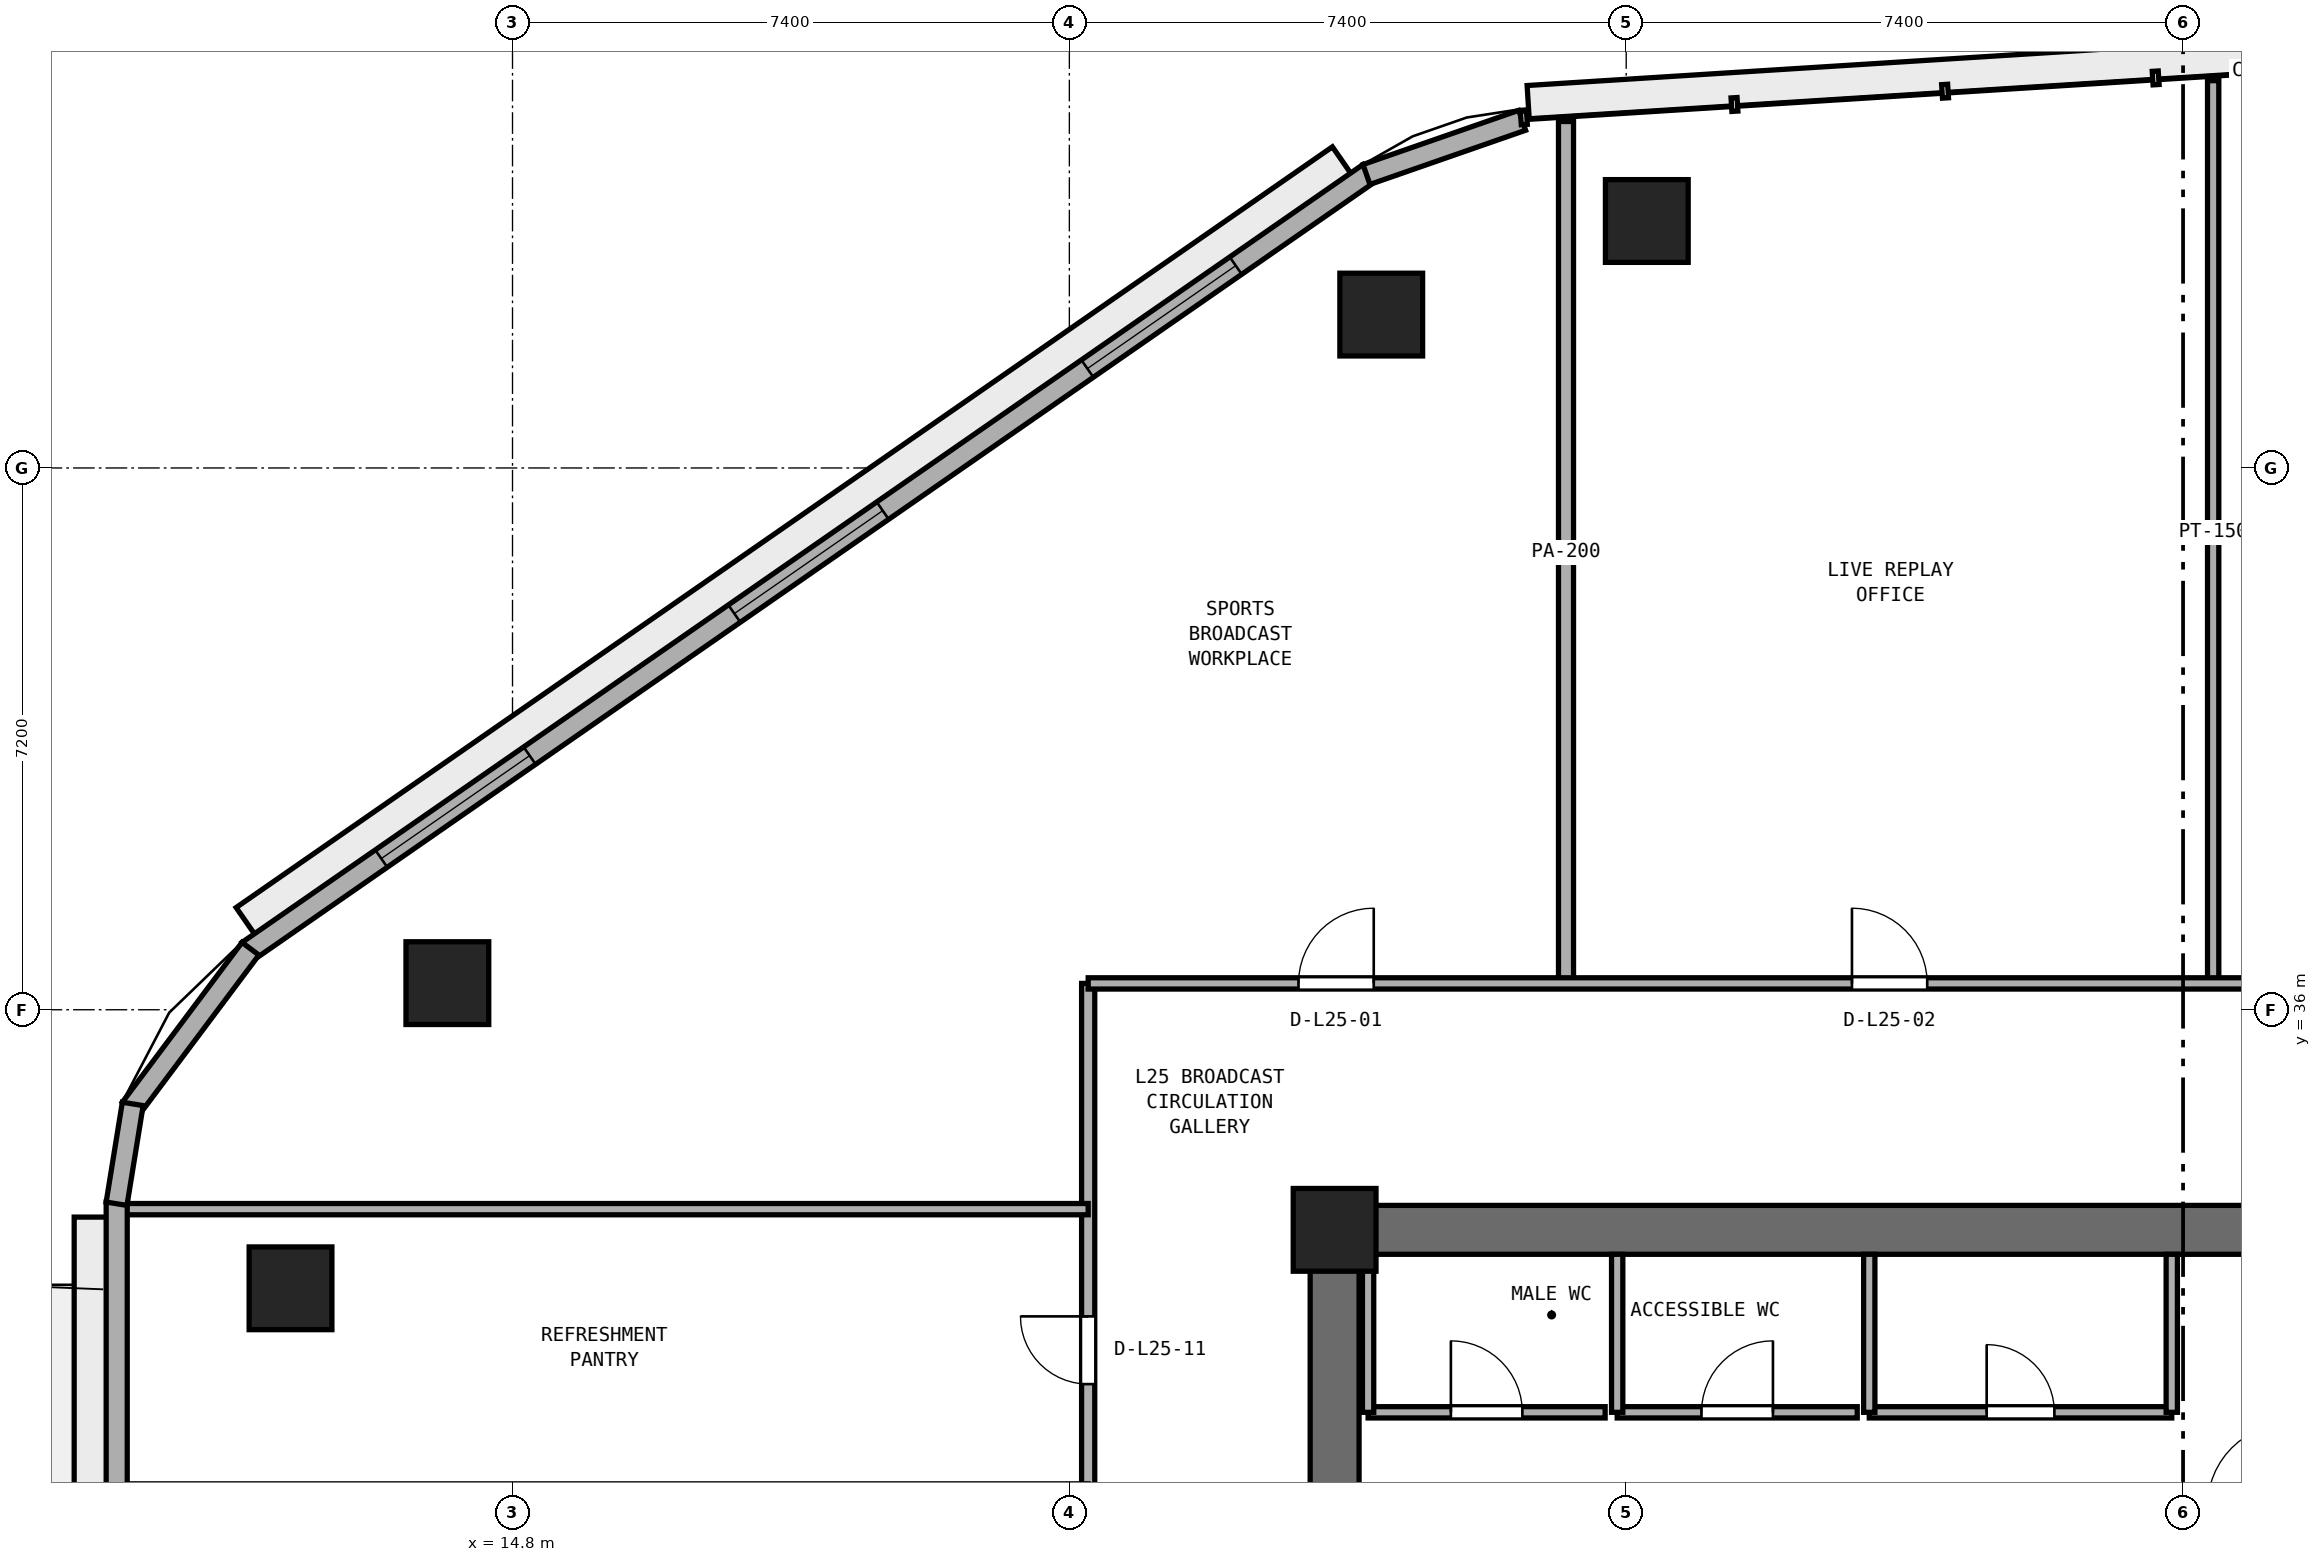
"""IFC4 building model, lengths in metres.
Left out: names, types, materials, properties, quantities, classifications, styles, units other than length and angle.
Written with IfcOpenShell. Run it as: python <this file> out.ifc"""

import sys

from ifc_helpers import new_model, si_unit, direction, frame, frame_2d, origin, origin_2d, place, context, subcontext, project, spatial, rectangle, extrude, element, fill, save


model = new_model("IFC4")
c1 = context("Model", 3, precision=1e-05, world=origin(), true_north=direction((0.0, 1.0)))
c2 = subcontext(c1, "Body", "Model", "MODEL_VIEW")
j1 = project(units=[si_unit("LENGTHUNIT", "METRE"), si_unit("PLANEANGLEUNIT", "RADIAN")], contexts=[c1])
p1 = place(None, origin())
s1 = spatial("IfcSite", under=j1, at=p1, CompositionType="ELEMENT")
p2 = place(p1, origin())
s2 = spatial("IfcBuilding", under=s1, at=p2, CompositionType="ELEMENT")
p3 = place(p2, frame((0.0, 0.0, 101.0)))
s3 = spatial("IfcBuildingStorey", under=s2, at=p3, CompositionType="ELEMENT", Elevation=101.0)
p4 = place(p3, frame((25.4, 33.075, 0.0), z_axis=(0.0, 0.0, 1.0), x_axis=(1.0, 0.0, 0.0)))
e1 = element("IfcWall", 1, at=p4, inside=s3, PredefinedType="SHEAR", context=c2, shape_type="SweptSolid", body=[
    extrude(rectangle(XDim=23.2, YDim=0.65, at=frame_2d((11.6, 0.0))), origin(), (0.0, 0.0, 1.0), 3.525),
])
p5 = place(p3, frame((25.725, 17.65, 0.0), z_axis=(0.0, 0.0, 1.0), x_axis=(0.0, 1.0, 0.0)))
e2 = element("IfcWall", 2, at=p5, inside=s3, PredefinedType="SHEAR", context=c2, shape_type="SweptSolid", body=[
    extrude(rectangle(XDim=15.1, YDim=0.65, at=frame_2d((7.55, 0.0))), origin(), (0.0, 0.0, 1.0), 3.525),
])
p6 = place(p5, frame((6.8, 0.0, 0.0)))
e3 = element("IfcOpeningElement", 3, at=p6, cuts=e2, PredefinedType="OPENING", context=c2, shape_type="SweptSolid", body=[
    extrude(rectangle(XDim=1.5, YDim=2.15, at=frame_2d((0.75, 1.075))), frame((0.0, 0.335, 0.0), z_axis=(0.0, -1.0, 0.0), x_axis=(1.0, 0.0, 0.0)), (0.0, 0.0, 1.0), 0.67),
])
p7 = place(p3, frame((25.725, 33.075, 0.0), z_axis=(0.0, 0.0, 1.0), x_axis=(1.0, 0.0, 0.0)))
e4 = element("IfcColumn", 4, at=p7, inside=s3, PredefinedType="PILASTER", context=c2, shape_type="SweptSolid", body=[
    extrude(rectangle(XDim=1.1, YDim=1.1, at=origin_2d()), origin(), (0.0, 0.0, 1.0), 3.8),
])
for number, where, z_axis, x_axis in (
    (5, (29.874, 46.482, 0.0), (0.0, 0.0, 1.0), (1.0, 0.0, 0.0)),
    (6, (26.344, 45.238, 0.0), (0.0, 0.0, 1.0), (1.0, 0.0, 0.0)),
    (7, (13.934, 36.354, 0.0), (0.0, 0.0, 1.0), (1.0, 0.0, 0.0)),
    (8, (11.85, 32.298, 0.0), (0.0, 0.0, 1.0), (1.0, 0.0, 0.0)),
):
    element("IfcColumn", number, at=place(p3, frame(where, z_axis=z_axis, x_axis=x_axis)), inside=s3, PredefinedType="COLUMN", context=c2, shape_type="SweptSolid", body=[
        extrude(rectangle(XDim=1.1, YDim=1.1, at=origin_2d()), origin(), (0.0, 0.0, 1.0), 3.8),
    ])
p8 = place(p3, frame((26.17, 30.65, 0.0), z_axis=(0.0, 0.0, 1.0), x_axis=(1.0, 0.0, 0.0)))
e9 = element("IfcWall", 9, at=p8, inside=s3, PredefinedType="PARTITIONING", context=c2, shape_type="SweptSolid", body=[
    extrude(rectangle(XDim=3.15, YDim=0.15, at=frame_2d((1.575, 0.0))), origin(), (0.0, 0.0, 1.0), 3.525),
])
p9 = place(p8, frame((1.1, 0.0, 0.0)))
e10 = element("IfcOpeningElement", 10, at=p9, cuts=e9, PredefinedType="OPENING", context=c2, shape_type="SweptSolid", body=[
    extrude(rectangle(XDim=0.95, YDim=2.1, at=frame_2d((0.475, 1.05))), frame((0.0, 0.085, 0.0), z_axis=(0.0, -1.0, 0.0), x_axis=(1.0, 0.0, 0.0)), (0.0, 0.0, 1.0), 0.17),
])
p10 = place(p3, frame((26.17, 30.65, 0.0), z_axis=(0.0, 0.0, 1.0), x_axis=(0.0, 1.0, 0.0)))
e11 = element("IfcWall", 11, at=p10, inside=s3, PredefinedType="PARTITIONING", context=c2, shape_type="SweptSolid", body=[
    extrude(rectangle(XDim=2.1, YDim=0.15, at=frame_2d((1.05, 0.0))), origin(), (0.0, 0.0, 1.0), 3.525),
])
p11 = place(p3, frame((29.48, 30.65, 0.0), z_axis=(0.0, 0.0, 1.0), x_axis=(1.0, 0.0, 0.0)))
e12 = element("IfcWall", 12, at=p11, inside=s3, PredefinedType="PARTITIONING", context=c2, shape_type="SweptSolid", body=[
    extrude(rectangle(XDim=3.19, YDim=0.15, at=frame_2d((1.595, 0.0))), origin(), (0.0, 0.0, 1.0), 3.525),
])
p12 = place(p11, frame((1.12, 0.0, 0.0)))
e13 = element("IfcOpeningElement", 13, at=p12, cuts=e12, PredefinedType="OPENING", context=c2, shape_type="SweptSolid", body=[
    extrude(rectangle(XDim=0.95, YDim=2.1, at=frame_2d((0.475, 1.05))), frame((0.0, 0.085, 0.0), z_axis=(0.0, -1.0, 0.0), x_axis=(1.0, 0.0, 0.0)), (0.0, 0.0, 1.0), 0.17),
])
p13 = place(p3, frame((29.48, 30.65, 0.0), z_axis=(0.0, 0.0, 1.0), x_axis=(0.0, 1.0, 0.0)))
e14 = element("IfcWall", 14, at=p13, inside=s3, PredefinedType="PARTITIONING", context=c2, shape_type="SweptSolid", body=[
    extrude(rectangle(XDim=2.1, YDim=0.15, at=frame_2d((1.05, 0.0))), origin(), (0.0, 0.0, 1.0), 3.525),
])
p14 = place(p3, frame((32.83, 30.65, 0.0), z_axis=(0.0, 0.0, 1.0), x_axis=(1.0, 0.0, 0.0)))
e15 = element("IfcWall", 15, at=p14, inside=s3, PredefinedType="PARTITIONING", context=c2, shape_type="SweptSolid", body=[
    extrude(rectangle(XDim=4.02, YDim=0.15, at=frame_2d((2.01, 0.0))), origin(), (0.0, 0.0, 1.0), 3.525),
])
p15 = place(p14, frame((1.56, 0.0, 0.0)))
e16 = element("IfcOpeningElement", 16, at=p15, cuts=e15, PredefinedType="OPENING", context=c2, shape_type="SweptSolid", body=[
    extrude(rectangle(XDim=0.9, YDim=2.1, at=frame_2d((0.45, 1.05))), frame((0.0, 0.085, 0.0), z_axis=(0.0, -1.0, 0.0), x_axis=(1.0, 0.0, 0.0)), (0.0, 0.0, 1.0), 0.17),
])
for number, where, z_axis, x_axis in (
    (17, (32.83, 30.65, 0.0), (0.0, 0.0, 1.0), (0.0, 1.0, 0.0)),
    (18, (36.85, 30.65, 0.0), (0.0, 0.0, 1.0), (0.0, 1.0, 0.0)),
):
    element("IfcWall", number, at=place(p3, frame(where, z_axis=z_axis, x_axis=x_axis)), inside=s3, PredefinedType="PARTITIONING", context=c2, shape_type="SweptSolid", body=[
        extrude(rectangle(XDim=2.1, YDim=0.15, at=frame_2d((1.05, 0.0))), origin(), (0.0, 0.0, 1.0), 3.525),
    ])
p16 = place(p3, frame((37.4, 36.35, 0.0), z_axis=(0.0, 0.0, 1.0), x_axis=(0.0, 1.0, 0.0)))
e19 = element("IfcWall", 19, at=p16, inside=s3, PredefinedType="PARTITIONING", context=c2, shape_type="SweptSolid", body=[
    extrude(rectangle(XDim=11.997, YDim=0.15, at=frame_2d((5.998, 0.0))), origin(), (0.0, 0.0, 1.0), 3.525),
])
p17 = place(p3, frame((28.8, 36.35, 0.0), z_axis=(0.0, 0.0, 1.0), x_axis=(0.0, 1.0, 0.0)))
e20 = element("IfcWall", 20, at=p17, inside=s3, PredefinedType="PARTITIONING", context=c2, shape_type="SweptSolid", body=[
    extrude(rectangle(XDim=11.454, YDim=0.2, at=frame_2d((5.727, 0.0))), origin(), (0.0, 0.0, 1.0), 3.525),
])
p18 = place(p3, frame((22.45, 14.05, 0.0), z_axis=(0.0, 0.0, 1.0), x_axis=(0.0, 1.0, 0.0)))
e21 = element("IfcWall", 21, at=p18, inside=s3, PredefinedType="PARTITIONING", context=c2, shape_type="SweptSolid", body=[
    extrude(rectangle(XDim=22.3, YDim=0.175, at=frame_2d((11.15, 0.0))), origin(), (0.0, 0.0, 1.0), 3.525),
])
p19 = place(p18, frame((5.075, 0.0, 0.0)))
e22 = element("IfcOpeningElement", 22, at=p19, cuts=e21, PredefinedType="OPENING", context=c2, shape_type="SweptSolid", body=[
    extrude(rectangle(XDim=0.9, YDim=2.1, at=frame_2d((0.45, 1.05))), frame((0.0, 0.097, 0.0), z_axis=(0.0, -1.0, 0.0), x_axis=(1.0, 0.0, 0.0)), (0.0, 0.0, 1.0), 0.195),
])
p20 = place(p18, frame((11.35, 0.0, 0.0)))
e23 = element("IfcOpeningElement", 23, at=p20, cuts=e21, PredefinedType="OPENING", context=c2, shape_type="SweptSolid", body=[
    extrude(rectangle(XDim=0.9, YDim=2.1, at=frame_2d((0.45, 1.05))), frame((0.0, 0.097, 0.0), z_axis=(0.0, -1.0, 0.0), x_axis=(1.0, 0.0, 0.0)), (0.0, 0.0, 1.0), 0.195),
])
p21 = place(p18, frame((16.975, 0.0, 0.0)))
e24 = element("IfcOpeningElement", 24, at=p21, cuts=e21, PredefinedType="OPENING", context=c2, shape_type="SweptSolid", body=[
    extrude(rectangle(XDim=0.9, YDim=2.1, at=frame_2d((0.45, 1.05))), frame((0.0, 0.097, 0.0), z_axis=(0.0, -1.0, 0.0), x_axis=(1.0, 0.0, 0.0)), (0.0, 0.0, 1.0), 0.195),
])
p22 = place(p3, frame((9.605, 33.35, 0.0), z_axis=(0.0, 0.0, 1.0), x_axis=(1.0, 0.0, 0.0)))
e25 = element("IfcWall", 25, at=p22, inside=s3, PredefinedType="PARTITIONING", context=c2, shape_type="SweptSolid", body=[
    extrude(rectangle(XDim=12.845, YDim=0.15, at=frame_2d((6.422, 0.0))), origin(), (0.0, 0.0, 1.0), 3.525),
])
p23 = place(p3, frame((22.45, 36.35, 0.0), z_axis=(0.0, 0.0, 1.0), x_axis=(1.0, 0.0, 0.0)))
e26 = element("IfcWall", 26, at=p23, inside=s3, PredefinedType="PARTITIONING", context=c2, shape_type="SweptSolid", body=[
    extrude(rectangle(XDim=29.1, YDim=0.15, at=frame_2d((14.55, 0.0))), origin(), (0.0, 0.0, 1.0), 3.525),
])
p24 = place(p23, frame((2.795, 0.0, 0.0)))
e27 = element("IfcOpeningElement", 27, at=p24, cuts=e26, PredefinedType="OPENING", context=c2, shape_type="SweptSolid", body=[
    extrude(rectangle(XDim=1.0, YDim=2.12, at=frame_2d((0.5, 1.06))), frame((0.0, 0.085, 0.0), z_axis=(0.0, -1.0, 0.0), x_axis=(1.0, 0.0, 0.0)), (0.0, 0.0, 1.0), 0.17),
])
p25 = place(p23, frame((10.15, 0.0, 0.0)))
e28 = element("IfcOpeningElement", 28, at=p25, cuts=e26, PredefinedType="OPENING", context=c2, shape_type="SweptSolid", body=[
    extrude(rectangle(XDim=1.0, YDim=2.12, at=frame_2d((0.5, 1.06))), frame((0.0, 0.085, 0.0), z_axis=(0.0, -1.0, 0.0), x_axis=(1.0, 0.0, 0.0)), (0.0, 0.0, 1.0), 0.17),
])
p26 = place(p23, frame((18.65, 0.0, 0.0)))
e29 = element("IfcOpeningElement", 29, at=p26, cuts=e26, PredefinedType="OPENING", context=c2, shape_type="SweptSolid", body=[
    extrude(rectangle(XDim=1.0, YDim=2.12, at=frame_2d((0.5, 1.06))), frame((0.0, 0.085, 0.0), z_axis=(0.0, -1.0, 0.0), x_axis=(1.0, 0.0, 0.0)), (0.0, 0.0, 1.0), 0.17),
])
p27 = place(p23, frame((25.605, 0.0, 0.0)))
e30 = element("IfcOpeningElement", 30, at=p27, cuts=e26, PredefinedType="OPENING", context=c2, shape_type="SweptSolid", body=[
    extrude(rectangle(XDim=1.0, YDim=2.12, at=frame_2d((0.5, 1.06))), frame((0.0, 0.085, 0.0), z_axis=(0.0, -1.0, 0.0), x_axis=(1.0, 0.0, 0.0)), (0.0, 0.0, 1.0), 0.17),
])
p28 = place(p3, frame((26.182, 47.118, 0.0), z_axis=(0.0, 0.0, 1.0), x_axis=(-0.821547956627, -0.570139417127, 0.0)))
e31 = element("IfcWall", 31, at=p28, inside=s3, PredefinedType="STANDARD", context=c2, shape_type="SweptSolid", body=[
    extrude(rectangle(XDim=18.132, YDim=0.28, at=frame_2d((9.066, 0.0))), origin(), (0.0, 0.0, 1.0), 3.525),
])
p29 = place(p28, frame((2.156, 0.0, 0.9)))
e32 = element("IfcOpeningElement", 32, at=p29, cuts=e31, PredefinedType="OPENING", context=c2, shape_type="SweptSolid", body=[
    extrude(rectangle(XDim=2.4, YDim=1.75, at=frame_2d((1.2, 0.875))), frame((0.0, 0.15, 0.0), z_axis=(0.0, -1.0, 0.0), x_axis=(1.0, 0.0, 0.0)), (0.0, 0.0, 1.0), 0.3),
])
p30 = place(p28, frame((7.866, 0.0, 0.9)))
e33 = element("IfcOpeningElement", 33, at=p30, cuts=e31, PredefinedType="OPENING", context=c2, shape_type="SweptSolid", body=[
    extrude(rectangle(XDim=2.4, YDim=1.75, at=frame_2d((1.2, 0.875))), frame((0.0, 0.15, 0.0), z_axis=(0.0, -1.0, 0.0), x_axis=(1.0, 0.0, 0.0)), (0.0, 0.0, 1.0), 0.3),
])
p31 = place(p28, frame((13.577, 0.0, 0.9)))
e34 = element("IfcOpeningElement", 34, at=p31, cuts=e31, PredefinedType="OPENING", context=c2, shape_type="SweptSolid", body=[
    extrude(rectangle(XDim=2.4, YDim=1.75, at=frame_2d((1.2, 0.875))), frame((0.0, 0.15, 0.0), z_axis=(0.0, -1.0, 0.0), x_axis=(1.0, 0.0, 0.0)), (0.0, 0.0, 1.0), 0.3),
])
p32 = place(p3, frame((9.54, 33.444, 0.0), z_axis=(0.0, 0.0, 1.0), x_axis=(0.0, -1.0, 0.0)))
e35 = element("IfcWall", 35, at=p32, inside=s3, PredefinedType="STANDARD", context=c2, shape_type="SweptSolid", body=[
    extrude(rectangle(XDim=17.301, YDim=0.28, at=frame_2d((8.65, 0.0))), origin(), (0.0, 0.0, 1.0), 3.525),
])
p33 = place(p32, frame((8.1, 0.0, 0.0)))
e36 = element("IfcOpeningElement", 36, at=p33, cuts=e35, PredefinedType="OPENING", context=c2, shape_type="SweptSolid", body=[
    extrude(rectangle(XDim=1.1, YDim=2.2, at=frame_2d((0.55, 1.1))), frame((0.0, 0.15, 0.0), z_axis=(0.0, -1.0, 0.0), x_axis=(1.0, 0.0, 0.0)), (0.0, 0.0, 1.0), 0.3),
])
p34 = place(p32, frame((12.884, 0.0, 0.9)))
e37 = element("IfcOpeningElement", 37, at=p34, cuts=e35, PredefinedType="OPENING", context=c2, shape_type="SweptSolid", body=[
    extrude(rectangle(XDim=2.4, YDim=1.75, at=frame_2d((1.2, 0.875))), frame((0.0, 0.15, 0.0), z_axis=(0.0, -1.0, 0.0), x_axis=(1.0, 0.0, 0.0)), (0.0, 0.0, 1.0), 0.3),
])
p35 = place(p3, frame((28.217, 47.82, 0.0), z_axis=(0.0, 0.0, 1.0), x_axis=(-0.944478751803, -0.328572499447, 0.0)))
e38 = element("IfcWall", 38, at=p35, inside=s3, PredefinedType="STANDARD", context=c2, shape_type="SweptSolid", body=[
    extrude(rectangle(XDim=2.19, YDim=0.28, at=frame_2d((1.095, 0.0))), origin(), (0.0, 0.0, 1.0), 3.525),
])
p36 = place(p3, frame((11.318, 36.811, 0.0), z_axis=(0.0, 0.0, 1.0), x_axis=(-0.599455152629, -0.800408345775, 0.0)))
e39 = element("IfcWall", 39, at=p36, inside=s3, PredefinedType="STANDARD", context=c2, shape_type="SweptSolid", body=[
    extrude(rectangle(XDim=2.653, YDim=0.28, at=frame_2d((1.327, 0.0))), origin(), (0.0, 0.0, 1.0), 3.525),
])
p37 = place(p3, frame((9.753, 34.749, 0.0), z_axis=(0.0, 0.0, 1.0), x_axis=(-0.160037671962, -0.987110907423, 0.0)))
e40 = element("IfcWall", 40, at=p37, inside=s3, PredefinedType="STANDARD", context=c2, shape_type="SweptSolid", body=[
    extrude(rectangle(XDim=1.344, YDim=0.28, at=frame_2d((0.672, 0.0))), origin(), (0.0, 0.0, 1.0), 3.525),
])
p38 = place(p9, origin())
e41 = element("IfcDoor", 41, at=p38, inside=s3, OperationType="SINGLE_SWING_LEFT", PredefinedType="DOOR", context=c2, shape_type="SweptSolid", body=[
    extrude(rectangle(XDim=0.95, YDim=2.1, at=frame_2d((0.475, 1.05))), frame((0.0, 0.025, 0.0), z_axis=(0.0, -1.0, 0.0), x_axis=(1.0, 0.0, 0.0)), (0.0, 0.0, 1.0), 0.05),
])
fill(e10, e41)
p39 = place(p12, origin())
e42 = element("IfcDoor", 42, at=p39, inside=s3, OperationType="SINGLE_SWING_RIGHT", PredefinedType="DOOR", context=c2, shape_type="SweptSolid", body=[
    extrude(rectangle(XDim=0.95, YDim=2.1, at=frame_2d((0.475, 1.05))), frame((0.0, 0.025, 0.0), z_axis=(0.0, -1.0, 0.0), x_axis=(1.0, 0.0, 0.0)), (0.0, 0.0, 1.0), 0.05),
])
fill(e13, e42)
p40 = place(p15, origin())
e43 = element("IfcDoor", 43, at=p40, inside=s3, OperationType="SINGLE_SWING_LEFT", PredefinedType="DOOR", context=c2, shape_type="SweptSolid", body=[
    extrude(rectangle(XDim=0.9, YDim=2.1, at=frame_2d((0.45, 1.05))), frame((0.0, 0.025, 0.0), z_axis=(0.0, -1.0, 0.0), x_axis=(1.0, 0.0, 0.0)), (0.0, 0.0, 1.0), 0.05),
])
fill(e16, e43)
p41 = place(p24, origin())
e44 = element("IfcDoor", 44, at=p41, inside=s3, OperationType="SINGLE_SWING_RIGHT", PredefinedType="DOOR", context=c2, shape_type="SweptSolid", body=[
    extrude(rectangle(XDim=1.0, YDim=2.12, at=frame_2d((0.5, 1.06))), frame((0.0, 0.025, 0.0), z_axis=(0.0, -1.0, 0.0), x_axis=(1.0, 0.0, 0.0)), (0.0, 0.0, 1.0), 0.05),
])
fill(e27, e44)
p42 = place(p25, origin())
e45 = element("IfcDoor", 45, at=p42, inside=s3, OperationType="SINGLE_SWING_LEFT", PredefinedType="DOOR", context=c2, shape_type="SweptSolid", body=[
    extrude(rectangle(XDim=1.0, YDim=2.12, at=frame_2d((0.5, 1.06))), frame((0.0, 0.025, 0.0), z_axis=(0.0, -1.0, 0.0), x_axis=(1.0, 0.0, 0.0)), (0.0, 0.0, 1.0), 0.05),
])
fill(e28, e45)
p43 = place(p21, origin())
e46 = element("IfcDoor", 46, at=p43, inside=s3, OperationType="SINGLE_SWING_RIGHT", PredefinedType="DOOR", context=c2, shape_type="SweptSolid", body=[
    extrude(rectangle(XDim=0.9, YDim=2.1, at=frame_2d((0.45, 1.05))), frame((0.0, 0.025, 0.0), z_axis=(0.0, -1.0, 0.0), x_axis=(1.0, 0.0, 0.0)), (0.0, 0.0, 1.0), 0.05),
])
fill(e24, e46)
p44 = place(p29, origin())
e47 = element("IfcWindow", 47, at=p44, inside=s3, PartitioningType="SINGLE_PANEL", PredefinedType="WINDOW", context=c2, shape_type="SweptSolid", body=[
    extrude(rectangle(XDim=2.4, YDim=1.75, at=frame_2d((1.2, 0.875))), frame((0.0, 0.03, 0.0), z_axis=(0.0, -1.0, 0.0), x_axis=(1.0, 0.0, 0.0)), (0.0, 0.0, 1.0), 0.06),
])
fill(e32, e47)
p45 = place(p30, origin())
e48 = element("IfcWindow", 48, at=p45, inside=s3, PartitioningType="SINGLE_PANEL", PredefinedType="WINDOW", context=c2, shape_type="SweptSolid", body=[
    extrude(rectangle(XDim=2.4, YDim=1.75, at=frame_2d((1.2, 0.875))), frame((0.0, 0.03, 0.0), z_axis=(0.0, -1.0, 0.0), x_axis=(1.0, 0.0, 0.0)), (0.0, 0.0, 1.0), 0.06),
])
fill(e33, e48)
p46 = place(p31, origin())
e49 = element("IfcWindow", 49, at=p46, inside=s3, PartitioningType="SINGLE_PANEL", PredefinedType="WINDOW", context=c2, shape_type="SweptSolid", body=[
    extrude(rectangle(XDim=2.4, YDim=1.75, at=frame_2d((1.2, 0.875))), frame((0.0, 0.03, 0.0), z_axis=(0.0, -1.0, 0.0), x_axis=(1.0, 0.0, 0.0)), (0.0, 0.0, 1.0), 0.06),
])
fill(e34, e49)
save(model, sys.argv[1])
